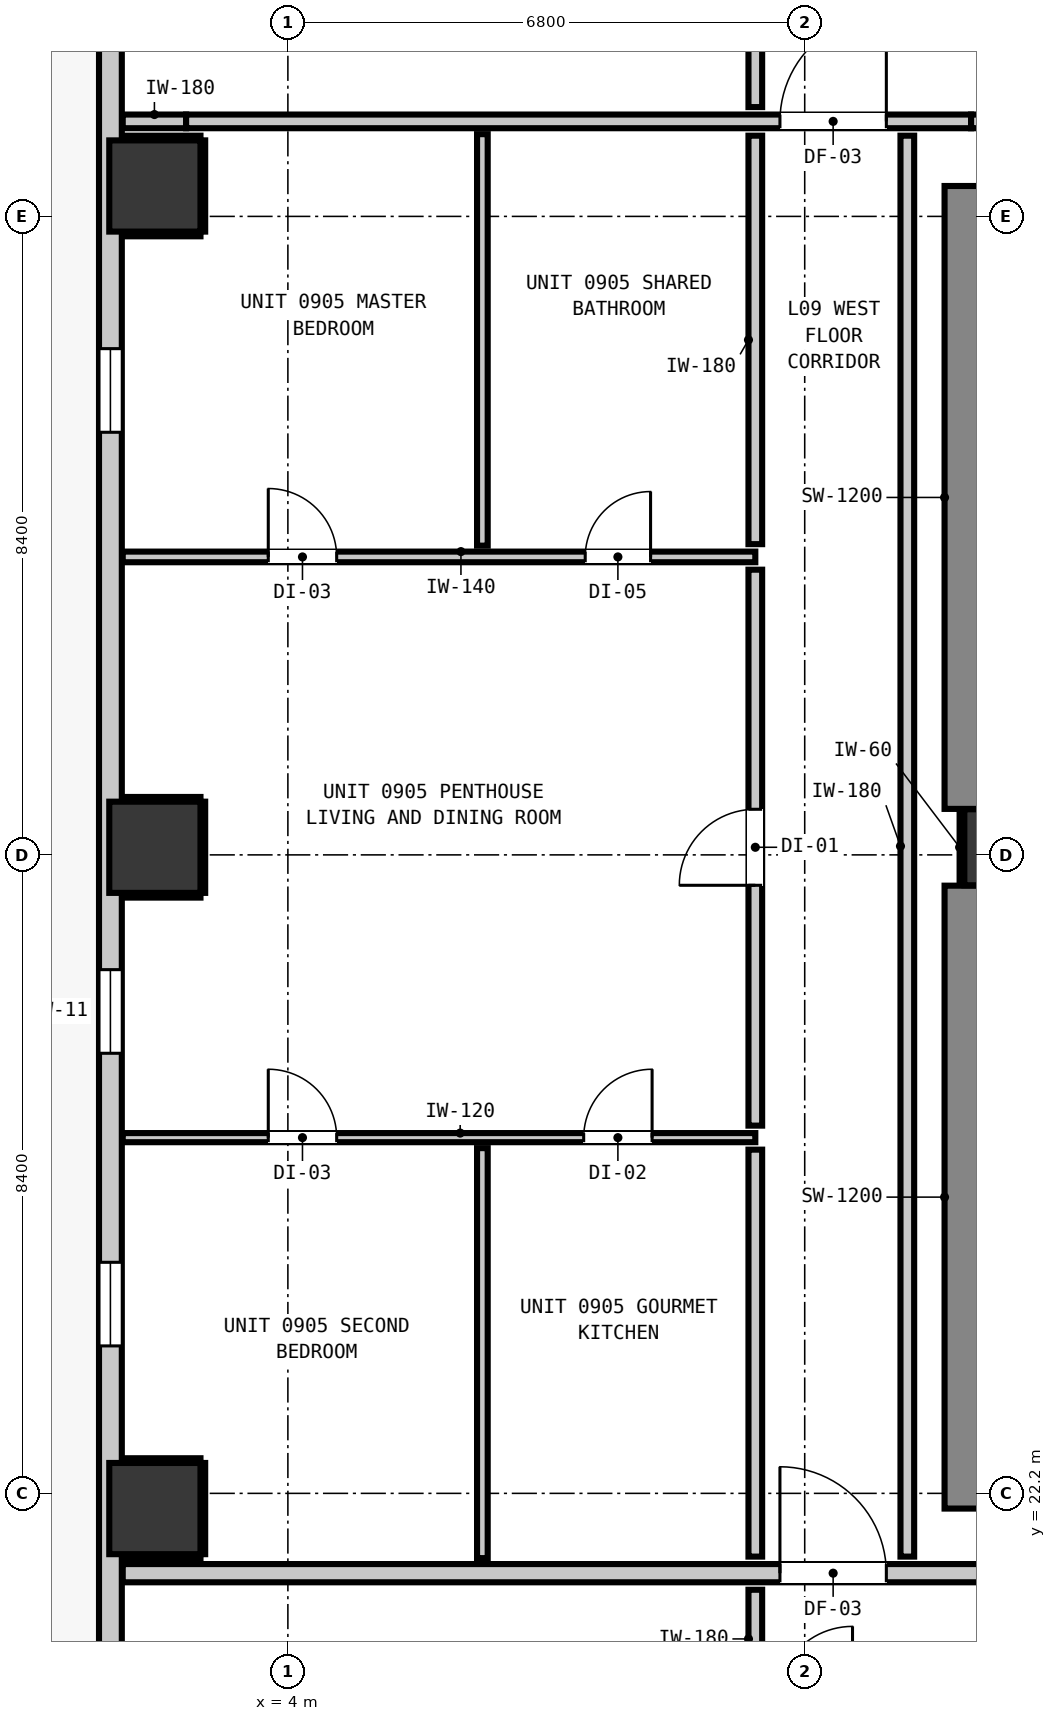
"""IFC4 building model, lengths in metres.
Left out: names, types, materials, properties, quantities, classifications, styles, units other than length and angle.
Written with IfcOpenShell. Run it as: python <this file> out.ifc"""

import sys

from ifc_helpers import new_model, si_unit, direction, frame, frame_2d, origin, origin_2d, place, context, subcontext, project, spatial, rectangle, extrude, element, fill, save


model = new_model("IFC4")
c1 = context("Model", 3, precision=1e-05, world=origin(), true_north=direction((0.0, 1.0)))
c2 = subcontext(c1, "Body", "Model", "MODEL_VIEW")
j1 = project(units=[si_unit("LENGTHUNIT", "METRE"), si_unit("PLANEANGLEUNIT", "RADIAN")], contexts=[c1])
p1 = place(None, origin())
s1 = spatial("IfcSite", under=j1, at=p1, CompositionType="ELEMENT")
p2 = place(p1, origin())
s2 = spatial("IfcBuilding", under=s1, at=p2, CompositionType="ELEMENT")
p3 = place(p2, frame((0.0, 0.0, 35.28)))
s3 = spatial("IfcBuildingStorey", under=s2, at=p3, CompositionType="ELEMENT", Elevation=35.28)
p4 = place(p3, frame((13.4, 30.7, 0.0), z_axis=(0.0, 0.0, 1.0), x_axis=(1.0, 0.0, 0.0)))
e1 = element("IfcColumn", 1, at=p4, inside=s3, PredefinedType="COLUMN", context=c2, shape_type="SweptSolid", body=[
    extrude(rectangle(XDim=1.0, YDim=1.0, at=origin_2d()), origin(), (0.0, 0.0, 1.0), 3.32),
])
p5 = place(p3, frame((13.24, 22.0, 0.0), z_axis=(0.0, 0.0, 1.0), x_axis=(0.0, 1.0, 0.0)))
e2 = element("IfcWall", 2, at=p5, inside=s3, PredefinedType="SHEAR", context=c2, shape_type="SweptSolid", body=[
    extrude(rectangle(XDim=8.195, YDim=1.2, at=frame_2d((4.098, 0.0))), origin(), (0.0, 0.0, 1.0), 3.32),
])
p6 = place(p3, frame((13.24, 31.205, 0.0), z_axis=(0.0, 0.0, 1.0), x_axis=(0.0, 1.0, 0.0)))
e3 = element("IfcWall", 3, at=p6, inside=s3, PredefinedType="SHEAR", context=c2, shape_type="SweptSolid", body=[
    extrude(rectangle(XDim=8.195, YDim=1.2, at=frame_2d((4.097, 0.0))), origin(), (0.0, 0.0, 1.0), 3.32),
])
for number, where, z_axis, x_axis in (
    (4, (2.25, 22.0, 0.0), (0.0, 0.0, 1.0), (1.0, 0.0, 0.0)),
    (5, (2.25, 30.7, 0.0), (0.0, 0.0, 1.0), (1.0, 0.0, 0.0)),
    (6, (2.25, 39.4, 0.0), (0.0, 0.0, 1.0), (1.0, 0.0, 0.0)),
):
    element("IfcColumn", number, at=place(p3, frame(where, z_axis=z_axis, x_axis=x_axis)), inside=s3, PredefinedType="COLUMN", context=c2, shape_type="SweptSolid", body=[
        extrude(rectangle(XDim=1.2, YDim=1.2, at=origin_2d()), origin(), (0.0, 0.0, 1.0), 3.32),
    ])
p7 = place(p3, frame((1.665, 10.165, 0.0), z_axis=(0.0, 0.0, 1.0), x_axis=(0.0, 1.0, 0.0)))
e7 = element("IfcWall", 7, at=p7, inside=s3, PredefinedType="STANDARD", context=c2, shape_type="SweptSolid", body=[
    extrude(rectangle(XDim=34.67, YDim=0.3, at=frame_2d((17.335, 0.0))), origin(), (0.0, 0.0, 1.0), 3.06),
])
p8 = place(p7, frame((0.901, 0.0, 0.0)))
e8 = element("IfcOpeningElement", 8, at=p8, cuts=e7, PredefinedType="OPENING", context=c2, shape_type="SweptSolid", body=[
    extrude(rectangle(XDim=1.0, YDim=2.15, at=frame_2d((0.5, 1.075))), frame((0.0, 0.16, 0.0), z_axis=(0.0, -1.0, 0.0), x_axis=(1.0, 0.0, 0.0)), (0.0, 0.0, 1.0), 0.32),
])
p9 = place(p7, frame((17.825, 0.0, 0.85)))
e9 = element("IfcOpeningElement", 9, at=p9, cuts=e7, PredefinedType="OPENING", context=c2, shape_type="SweptSolid", body=[
    extrude(rectangle(XDim=1.1, YDim=2.05, at=frame_2d((0.55, 1.025))), frame((0.0, 0.16, 0.0), z_axis=(0.0, -1.0, 0.0), x_axis=(1.0, 0.0, 0.0)), (0.0, 0.0, 1.0), 0.32),
])
p10 = place(p7, frame((13.975, 0.0, 0.85)))
e10 = element("IfcOpeningElement", 10, at=p10, cuts=e7, PredefinedType="OPENING", context=c2, shape_type="SweptSolid", body=[
    extrude(rectangle(XDim=1.1, YDim=2.05, at=frame_2d((0.55, 1.025))), frame((0.0, 0.16, 0.0), z_axis=(0.0, -1.0, 0.0), x_axis=(1.0, 0.0, 0.0)), (0.0, 0.0, 1.0), 0.32),
])
p11 = place(p7, frame((25.995, 0.0, 0.85)))
e11 = element("IfcOpeningElement", 11, at=p11, cuts=e7, PredefinedType="OPENING", context=c2, shape_type="SweptSolid", body=[
    extrude(rectangle(XDim=1.1, YDim=2.05, at=frame_2d((0.55, 1.025))), frame((0.0, 0.16, 0.0), z_axis=(0.0, -1.0, 0.0), x_axis=(1.0, 0.0, 0.0)), (0.0, 0.0, 1.0), 0.32),
])
p12 = place(p3, frame((1.827, 21.15, 0.0), z_axis=(0.0, 0.0, 1.0), x_axis=(1.0, 0.0, 0.0)))
e12 = element("IfcWall", 12, at=p12, inside=s3, PredefinedType="PARTITIONING", context=c2, shape_type="SweptSolid", body=[
    extrude(rectangle(XDim=42.146, YDim=0.24, at=frame_2d((21.073, 0.0))), origin(), (0.0, 0.0, 1.0), 3.06),
])
p13 = place(p12, frame((16.383, 0.0, 0.0)))
e13 = element("IfcOpeningElement", 13, at=p13, cuts=e12, PredefinedType="OPENING", context=c2, shape_type="SweptSolid", body=[
    extrude(rectangle(XDim=1.1, YDim=2.15, at=frame_2d((0.55, 1.075))), frame((0.0, 0.13, 0.0), z_axis=(0.0, -1.0, 0.0), x_axis=(1.0, 0.0, 0.0)), (0.0, 0.0, 1.0), 0.26),
])
p14 = place(p12, frame((8.647, 0.0, 0.0)))
e14 = element("IfcOpeningElement", 14, at=p14, cuts=e12, PredefinedType="OPENING", context=c2, shape_type="SweptSolid", body=[
    extrude(rectangle(XDim=1.4, YDim=2.15, at=frame_2d((0.7, 1.075))), frame((0.0, 0.13, 0.0), z_axis=(0.0, -1.0, 0.0), x_axis=(1.0, 0.0, 0.0)), (0.0, 0.0, 1.0), 0.26),
])
p15 = place(p12, frame((38.574, 0.0, 0.0)))
e15 = element("IfcOpeningElement", 15, at=p15, cuts=e12, PredefinedType="OPENING", context=c2, shape_type="SweptSolid", body=[
    extrude(rectangle(XDim=0.9, YDim=2.1, at=frame_2d((0.45, 1.05))), frame((0.0, 0.13, 0.0), z_axis=(0.0, -1.0, 0.0), x_axis=(1.0, 0.0, 0.0)), (0.0, 0.0, 1.0), 0.26),
])
p16 = place(p3, frame((1.827, 40.25, 0.0), z_axis=(0.0, 0.0, 1.0), x_axis=(1.0, 0.0, 0.0)))
e16 = element("IfcWall", 16, at=p16, inside=s3, PredefinedType="PARTITIONING", context=c2, shape_type="SweptSolid", body=[
    extrude(rectangle(XDim=0.834, YDim=0.18, at=frame_2d((0.417, 0.0))), origin(), (0.0, 0.0, 1.0), 3.06),
])
p17 = place(p3, frame((2.661, 40.25, 0.0), z_axis=(0.0, 0.0, 1.0), x_axis=(1.0, 0.0, 0.0)))
e17 = element("IfcWall", 17, at=p17, inside=s3, PredefinedType="PARTITIONING", context=c2, shape_type="SweptSolid", body=[
    extrude(rectangle(XDim=10.328, YDim=0.18, at=frame_2d((5.164, 0.0))), origin(), (0.0, 0.0, 1.0), 2.445),
])
p18 = place(p17, frame((7.813, 0.0, 0.0)))
e18 = element("IfcOpeningElement", 18, at=p18, cuts=e17, PredefinedType="OPENING", context=c2, shape_type="SweptSolid", body=[
    extrude(rectangle(XDim=1.4, YDim=2.15, at=frame_2d((0.7, 1.075))), frame((0.0, 0.1, 0.0), z_axis=(0.0, -1.0, 0.0), x_axis=(1.0, 0.0, 0.0)), (0.0, 0.0, 1.0), 0.2),
])
p19 = place(p3, frame((12.989, 40.25, 0.0), z_axis=(0.0, 0.0, 1.0), x_axis=(1.0, 0.0, 0.0)))
e19 = element("IfcWall", 19, at=p19, inside=s3, PredefinedType="PARTITIONING", context=c2, shape_type="SweptSolid", body=[
    extrude(rectangle(XDim=30.984, YDim=0.18, at=frame_2d((15.492, 0.0))), origin(), (0.0, 0.0, 1.0), 3.06),
])
p20 = place(p19, frame((4.446, 0.0, 0.0)))
e20 = element("IfcOpeningElement", 20, at=p20, cuts=e19, PredefinedType="OPENING", context=c2, shape_type="SweptSolid", body=[
    extrude(rectangle(XDim=1.4, YDim=2.15, at=frame_2d((0.7, 1.075))), frame((0.0, 0.1, 0.0), z_axis=(0.0, -1.0, 0.0), x_axis=(1.0, 0.0, 0.0)), (0.0, 0.0, 1.0), 0.2),
])
p21 = place(p19, frame((27.362, 0.0, 0.0)))
e21 = element("IfcOpeningElement", 21, at=p21, cuts=e19, PredefinedType="OPENING", context=c2, shape_type="SweptSolid", body=[
    extrude(rectangle(XDim=1.0, YDim=2.15, at=frame_2d((0.5, 1.075))), frame((0.0, 0.1, 0.0), z_axis=(0.0, -1.0, 0.0), x_axis=(1.0, 0.0, 0.0)), (0.0, 0.0, 1.0), 0.2),
])
p22 = place(p3, frame((1.827, 34.52, 0.0), z_axis=(0.0, 0.0, 1.0), x_axis=(1.0, 0.0, 0.0)))
e22 = element("IfcWall", 22, at=p22, inside=s3, PredefinedType="PARTITIONING", context=c2, shape_type="SweptSolid", body=[
    extrude(rectangle(XDim=8.323, YDim=0.14, at=frame_2d((4.162, 0.0))), origin(), (0.0, 0.0, 1.0), 3.06),
])
p23 = place(p22, frame((6.085, 0.0, 0.0)))
e23 = element("IfcOpeningElement", 23, at=p23, cuts=e22, PredefinedType="OPENING", context=c2, shape_type="SweptSolid", body=[
    extrude(rectangle(XDim=0.86, YDim=2.02, at=frame_2d((0.43, 1.01))), frame((0.0, 0.08, 0.0), z_axis=(0.0, -1.0, 0.0), x_axis=(1.0, 0.0, 0.0)), (0.0, 0.0, 1.0), 0.16),
])
p24 = place(p22, frame((1.915, 0.0, 0.0)))
e24 = element("IfcOpeningElement", 24, at=p24, cuts=e22, PredefinedType="OPENING", context=c2, shape_type="SweptSolid", body=[
    extrude(rectangle(XDim=0.9, YDim=2.1, at=frame_2d((0.45, 1.05))), frame((0.0, 0.08, 0.0), z_axis=(0.0, -1.0, 0.0), x_axis=(1.0, 0.0, 0.0)), (0.0, 0.0, 1.0), 0.16),
])
p25 = place(p3, frame((1.827, 26.88, 0.0), z_axis=(0.0, 0.0, 1.0), x_axis=(1.0, 0.0, 0.0)))
e25 = element("IfcWall", 25, at=p25, inside=s3, PredefinedType="PARTITIONING", context=c2, shape_type="SweptSolid", body=[
    extrude(rectangle(XDim=8.323, YDim=0.12, at=frame_2d((4.162, 0.0))), origin(), (0.0, 0.0, 1.0), 3.06),
])
p26 = place(p25, frame((6.065, 0.0, 0.0)))
e26 = element("IfcOpeningElement", 26, at=p26, cuts=e25, PredefinedType="OPENING", context=c2, shape_type="SweptSolid", body=[
    extrude(rectangle(XDim=0.9, YDim=2.1, at=frame_2d((0.45, 1.05))), frame((0.0, 0.07, 0.0), z_axis=(0.0, -1.0, 0.0), x_axis=(1.0, 0.0, 0.0)), (0.0, 0.0, 1.0), 0.14),
])
p27 = place(p25, frame((1.915, 0.0, 0.0)))
e27 = element("IfcOpeningElement", 27, at=p27, cuts=e25, PredefinedType="OPENING", context=c2, shape_type="SweptSolid", body=[
    extrude(rectangle(XDim=0.9, YDim=2.1, at=frame_2d((0.45, 1.05))), frame((0.0, 0.07, 0.0), z_axis=(0.0, -1.0, 0.0), x_axis=(1.0, 0.0, 0.0)), (0.0, 0.0, 1.0), 0.14),
])
p28 = place(p3, frame((10.15, 19.638, 0.0), z_axis=(0.0, 0.0, 1.0), x_axis=(0.0, 1.0, 0.0)))
e28 = element("IfcWall", 28, at=p28, inside=s3, PredefinedType="PARTITIONING", context=c2, shape_type="SweptSolid", body=[
    extrude(rectangle(XDim=1.294, YDim=0.18, at=frame_2d((0.647, 0.0))), origin(), (0.0, 0.0, 1.0), 3.06),
])
p29 = place(p3, frame((10.15, 21.368, 0.0), z_axis=(0.0, 0.0, 1.0), x_axis=(0.0, 1.0, 0.0)))
e29 = element("IfcWall", 29, at=p29, inside=s3, PredefinedType="PARTITIONING", context=c2, shape_type="SweptSolid", body=[
    extrude(rectangle(XDim=5.354, YDim=0.18, at=frame_2d((2.677, 0.0))), origin(), (0.0, 0.0, 1.0), 3.06),
])
p30 = place(p3, frame((10.15, 27.038, 0.0), z_axis=(0.0, 0.0, 1.0), x_axis=(0.0, 1.0, 0.0)))
e30 = element("IfcWall", 30, at=p30, inside=s3, PredefinedType="PARTITIONING", context=c2, shape_type="SweptSolid", body=[
    extrude(rectangle(XDim=7.314, YDim=0.18, at=frame_2d((3.657, 0.0))), origin(), (0.0, 0.0, 1.0), 3.06),
])
p31 = place(p30, frame((3.162, 0.0, 0.0)))
e31 = element("IfcOpeningElement", 31, at=p31, cuts=e30, PredefinedType="OPENING", context=c2, shape_type="SweptSolid", body=[
    extrude(rectangle(XDim=1.0, YDim=2.15, at=frame_2d((0.5, 1.075))), frame((0.0, 0.1, 0.0), z_axis=(0.0, -1.0, 0.0), x_axis=(1.0, 0.0, 0.0)), (0.0, 0.0, 1.0), 0.2),
])
p32 = place(p3, frame((10.15, 34.688, 0.0), z_axis=(0.0, 0.0, 1.0), x_axis=(0.0, 1.0, 0.0)))
e32 = element("IfcWall", 32, at=p32, inside=s3, PredefinedType="PARTITIONING", context=c2, shape_type="SweptSolid", body=[
    extrude(rectangle(XDim=5.374, YDim=0.18, at=frame_2d((2.687, 0.0))), origin(), (0.0, 0.0, 1.0), 3.06),
])
p33 = place(p3, frame((10.15, 40.438, 0.0), z_axis=(0.0, 0.0, 1.0), x_axis=(0.0, 1.0, 0.0)))
e33 = element("IfcWall", 33, at=p33, inside=s3, PredefinedType="PARTITIONING", context=c2, shape_type="SweptSolid", body=[
    extrude(rectangle(XDim=1.324, YDim=0.18, at=frame_2d((0.662, 0.0))), origin(), (0.0, 0.0, 1.0), 3.06),
])
p34 = place(p3, frame((12.15, 21.368, 0.0), z_axis=(0.0, 0.0, 1.0), x_axis=(0.0, 1.0, 0.0)))
e34 = element("IfcWall", 34, at=p34, inside=s3, PredefinedType="PARTITIONING", context=c2, shape_type="SweptSolid", body=[
    extrude(rectangle(XDim=18.694, YDim=0.18, at=frame_2d((9.347, 0.0))), origin(), (0.0, 0.0, 1.0), 3.06),
])
p35 = place(p3, frame((6.559, 21.348, 0.0), z_axis=(0.0, 0.0, 1.0), x_axis=(0.0, 1.0, 0.0)))
e35 = element("IfcWall", 35, at=p35, inside=s3, PredefinedType="PARTITIONING", context=c2, shape_type="SweptSolid", body=[
    extrude(rectangle(XDim=5.394, YDim=0.14, at=frame_2d((2.697, 0.0))), origin(), (0.0, 0.0, 1.0), 3.06),
])
p36 = place(p3, frame((6.559, 34.668, 0.0), z_axis=(0.0, 0.0, 1.0), x_axis=(0.0, 1.0, 0.0)))
e36 = element("IfcWall", 36, at=p36, inside=s3, PredefinedType="PARTITIONING", context=c2, shape_type="SweptSolid", body=[
    extrude(rectangle(XDim=5.414, YDim=0.14, at=frame_2d((2.707, 0.0))), origin(), (0.0, 0.0, 1.0), 3.06),
])
p37 = place(p3, frame((12.868, 30.21, 0.0), z_axis=(0.0, 0.0, 1.0), x_axis=(0.0, 1.0, 0.0)))
e37 = element("IfcWall", 37, at=p37, inside=s3, PredefinedType="PARTITIONING", context=c2, shape_type="SweptSolid", body=[
    extrude(rectangle(XDim=0.98, YDim=0.06, at=frame_2d((0.49, 0.0))), origin(), (0.0, 0.0, 1.0), 1.45),
])
for number, where, z_axis, x_axis in (
    (38, (1.83, 21.368, 0.0), (0.0, 0.0, 1.0), (1.0, 0.0, 0.0)),
    (39, (1.83, 22.632, 0.0), (0.0, 0.0, 1.0), (1.0, 0.0, 0.0)),
):
    element("IfcWall", number, at=place(p3, frame(where, z_axis=z_axis, x_axis=x_axis)), inside=s3, PredefinedType="PARTITIONING", context=c2, shape_type="SweptSolid", body=[
        extrude(rectangle(XDim=1.02, YDim=0.06, at=frame_2d((0.51, 0.0))), origin(), (0.0, 0.0, 1.0), 1.45),
    ])
p38 = place(p3, frame((2.882, 21.4, 0.0), z_axis=(0.0, 0.0, 1.0), x_axis=(0.0, 1.0, 0.0)))
e40 = element("IfcWall", 40, at=p38, inside=s3, PredefinedType="PARTITIONING", context=c2, shape_type="SweptSolid", body=[
    extrude(rectangle(XDim=1.2, YDim=0.06, at=frame_2d((0.6, 0.0))), origin(), (0.0, 0.0, 1.0), 1.45),
])
for number, where, z_axis, x_axis in (
    (41, (1.83, 30.068, 0.0), (0.0, 0.0, 1.0), (1.0, 0.0, 0.0)),
    (42, (1.83, 31.332, 0.0), (0.0, 0.0, 1.0), (1.0, 0.0, 0.0)),
):
    element("IfcWall", number, at=place(p3, frame(where, z_axis=z_axis, x_axis=x_axis)), inside=s3, PredefinedType="PARTITIONING", context=c2, shape_type="SweptSolid", body=[
        extrude(rectangle(XDim=1.02, YDim=0.06, at=frame_2d((0.51, 0.0))), origin(), (0.0, 0.0, 1.0), 1.45),
    ])
p39 = place(p3, frame((2.882, 30.1, 0.0), z_axis=(0.0, 0.0, 1.0), x_axis=(0.0, 1.0, 0.0)))
e43 = element("IfcWall", 43, at=p39, inside=s3, PredefinedType="PARTITIONING", context=c2, shape_type="SweptSolid", body=[
    extrude(rectangle(XDim=1.2, YDim=0.06, at=frame_2d((0.6, 0.0))), origin(), (0.0, 0.0, 1.0), 1.45),
])
for number, where, z_axis, x_axis in (
    (44, (1.83, 38.768, 0.0), (0.0, 0.0, 1.0), (1.0, 0.0, 0.0)),
    (45, (1.83, 40.032, 0.0), (0.0, 0.0, 1.0), (1.0, 0.0, 0.0)),
):
    element("IfcWall", number, at=place(p3, frame(where, z_axis=z_axis, x_axis=x_axis)), inside=s3, PredefinedType="PARTITIONING", context=c2, shape_type="SweptSolid", body=[
        extrude(rectangle(XDim=1.02, YDim=0.06, at=frame_2d((0.51, 0.0))), origin(), (0.0, 0.0, 1.0), 1.45),
    ])
p40 = place(p3, frame((2.882, 38.8, 0.0), z_axis=(0.0, 0.0, 1.0), x_axis=(0.0, 1.0, 0.0)))
e46 = element("IfcWall", 46, at=p40, inside=s3, PredefinedType="PARTITIONING", context=c2, shape_type="SweptSolid", body=[
    extrude(rectangle(XDim=1.2, YDim=0.06, at=frame_2d((0.6, 0.0))), origin(), (0.0, 0.0, 1.0), 1.45),
])
p41 = place(p9, origin())
e47 = element("IfcWindow", 47, at=p41, inside=s3, PartitioningType="SINGLE_PANEL", PredefinedType="WINDOW", context=c2, shape_type="SweptSolid", body=[
    extrude(rectangle(XDim=1.1, YDim=2.05, at=frame_2d((0.55, 1.025))), frame((0.0, 0.03, 0.0), z_axis=(0.0, -1.0, 0.0), x_axis=(1.0, 0.0, 0.0)), (0.0, 0.0, 1.0), 0.06),
])
fill(e9, e47)
p42 = place(p10, origin())
e48 = element("IfcWindow", 48, at=p42, inside=s3, PartitioningType="SINGLE_PANEL", PredefinedType="WINDOW", context=c2, shape_type="SweptSolid", body=[
    extrude(rectangle(XDim=1.1, YDim=2.05, at=frame_2d((0.55, 1.025))), frame((0.0, 0.03, 0.0), z_axis=(0.0, -1.0, 0.0), x_axis=(1.0, 0.0, 0.0)), (0.0, 0.0, 1.0), 0.06),
])
fill(e10, e48)
p43 = place(p11, origin())
e49 = element("IfcWindow", 49, at=p43, inside=s3, PartitioningType="SINGLE_PANEL", PredefinedType="WINDOW", context=c2, shape_type="SweptSolid", body=[
    extrude(rectangle(XDim=1.1, YDim=2.05, at=frame_2d((0.55, 1.025))), frame((0.0, 0.03, 0.0), z_axis=(0.0, -1.0, 0.0), x_axis=(1.0, 0.0, 0.0)), (0.0, 0.0, 1.0), 0.06),
])
fill(e11, e49)
p44 = place(p14, origin())
e50 = element("IfcDoor", 50, at=p44, inside=s3, OperationType="SINGLE_SWING_LEFT", PredefinedType="DOOR", context=c2, shape_type="SweptSolid", body=[
    extrude(rectangle(XDim=1.4, YDim=2.15, at=frame_2d((0.7, 1.075))), frame((0.0, 0.025, 0.0), z_axis=(0.0, -1.0, 0.0), x_axis=(1.0, 0.0, 0.0)), (0.0, 0.0, 1.0), 0.05),
])
fill(e14, e50)
p45 = place(p18, origin())
e51 = element("IfcDoor", 51, at=p45, inside=s3, OperationType="SINGLE_SWING_RIGHT", PredefinedType="DOOR", context=c2, shape_type="SweptSolid", body=[
    extrude(rectangle(XDim=1.4, YDim=2.15, at=frame_2d((0.7, 1.075))), frame((0.0, 0.025, 0.0), z_axis=(0.0, -1.0, 0.0), x_axis=(1.0, 0.0, 0.0)), (0.0, 0.0, 1.0), 0.05),
])
fill(e18, e51)
p46 = place(p31, origin())
e52 = element("IfcDoor", 52, at=p46, inside=s3, OperationType="SINGLE_SWING_LEFT", PredefinedType="DOOR", context=c2, shape_type="SweptSolid", body=[
    extrude(rectangle(XDim=1.0, YDim=2.15, at=frame_2d((0.5, 1.075))), frame((0.0, 0.025, 0.0), z_axis=(0.0, -1.0, 0.0), x_axis=(1.0, 0.0, 0.0)), (0.0, 0.0, 1.0), 0.05),
])
fill(e31, e52)
p47 = place(p26, origin())
e53 = element("IfcDoor", 53, at=p47, inside=s3, OperationType="SINGLE_SWING_RIGHT", PredefinedType="DOOR", context=c2, shape_type="SweptSolid", body=[
    extrude(rectangle(XDim=0.9, YDim=2.1, at=frame_2d((0.45, 1.05))), frame((0.0, 0.025, 0.0), z_axis=(0.0, -1.0, 0.0), x_axis=(1.0, 0.0, 0.0)), (0.0, 0.0, 1.0), 0.05),
])
fill(e26, e53)
p48 = place(p27, origin())
e54 = element("IfcDoor", 54, at=p48, inside=s3, OperationType="SINGLE_SWING_LEFT", PredefinedType="DOOR", context=c2, shape_type="SweptSolid", body=[
    extrude(rectangle(XDim=0.9, YDim=2.1, at=frame_2d((0.45, 1.05))), frame((0.0, 0.025, 0.0), z_axis=(0.0, -1.0, 0.0), x_axis=(1.0, 0.0, 0.0)), (0.0, 0.0, 1.0), 0.05),
])
fill(e27, e54)
p49 = place(p23, origin())
e55 = element("IfcDoor", 55, at=p49, inside=s3, OperationType="SINGLE_SWING_RIGHT", PredefinedType="DOOR", context=c2, shape_type="SweptSolid", body=[
    extrude(rectangle(XDim=0.86, YDim=2.02, at=frame_2d((0.43, 1.01))), frame((0.0, 0.025, 0.0), z_axis=(0.0, -1.0, 0.0), x_axis=(1.0, 0.0, 0.0)), (0.0, 0.0, 1.0), 0.05),
])
fill(e23, e55)
p50 = place(p24, origin())
e56 = element("IfcDoor", 56, at=p50, inside=s3, OperationType="SINGLE_SWING_LEFT", PredefinedType="DOOR", context=c2, shape_type="SweptSolid", body=[
    extrude(rectangle(XDim=0.9, YDim=2.1, at=frame_2d((0.45, 1.05))), frame((0.0, 0.025, 0.0), z_axis=(0.0, -1.0, 0.0), x_axis=(1.0, 0.0, 0.0)), (0.0, 0.0, 1.0), 0.05),
])
fill(e24, e56)
save(model, sys.argv[1])
